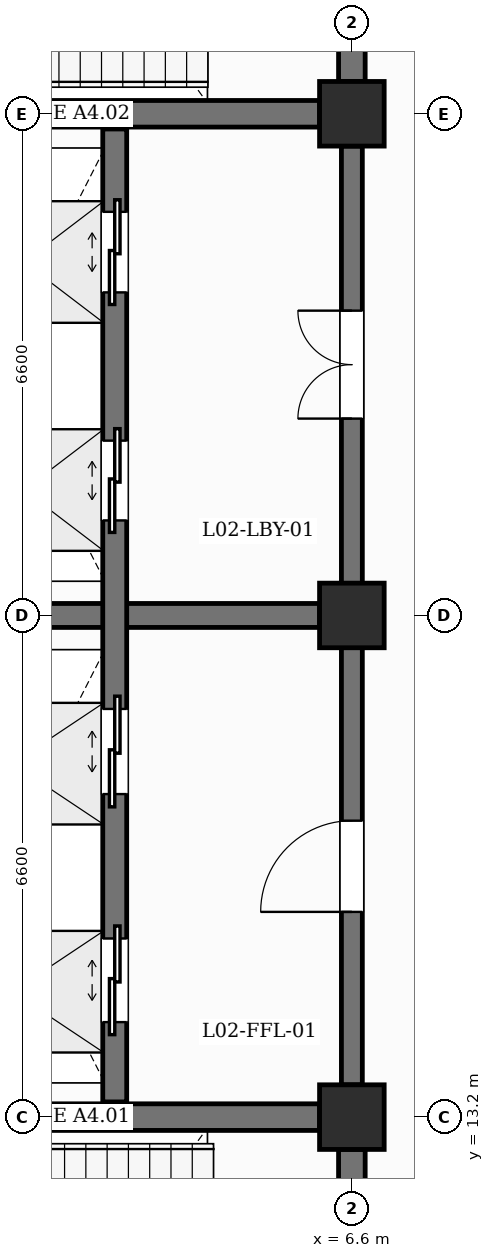
"""IFC4 building model, lengths in metres.
Left out: names, types, materials, properties, quantities, classifications, styles, units other than length and angle.
Written with IfcOpenShell. Run it as: python <this file> out.ifc"""

import sys

from ifc_helpers import new_model, si_unit, direction, frame, frame_2d, origin, origin_2d, place, context, subcontext, project, spatial, rectangle, extrude, element, fill, save


model = new_model("IFC4")
c1 = context("Model", 3, precision=1e-05, world=origin(), true_north=direction((0.0, 1.0)))
c2 = subcontext(c1, "Body", "Model", "MODEL_VIEW")
j1 = project(units=[si_unit("LENGTHUNIT", "METRE"), si_unit("PLANEANGLEUNIT", "RADIAN")], contexts=[c1])
p1 = place(None, origin())
s1 = spatial("IfcSite", under=j1, at=p1, CompositionType="ELEMENT")
p2 = place(p1, origin())
s2 = spatial("IfcBuilding", under=s1, at=p2, CompositionType="ELEMENT")
p3 = place(p2, frame((0.0, 0.0, 10.2)))
s3 = spatial("IfcBuildingStorey", under=s2, at=p3, CompositionType="ELEMENT", Elevation=10.2)
for number, where, z_axis, x_axis in (
    (1, (6.6, 13.2, 0.0), (0.0, 0.0, 1.0), (1.0, 0.0, 0.0)),
    (2, (6.6, 19.8, 0.0), (0.0, 0.0, 1.0), (1.0, 0.0, 0.0)),
    (3, (6.6, 26.4, 0.0), (0.0, 0.0, 1.0), (1.0, 0.0, 0.0)),
):
    element("IfcColumn", number, at=place(p3, frame(where, z_axis=z_axis, x_axis=x_axis)), inside=s3, PredefinedType="COLUMN", context=c2, shape_type="SweptSolid", body=[
        extrude(rectangle(XDim=0.85, YDim=0.85, at=origin_2d()), origin(), (0.0, 0.0, 1.0), 4.2),
    ])
p4 = place(p3, frame((0.425, 13.2, 0.0), z_axis=(0.0, 0.0, 1.0), x_axis=(1.0, 0.0, 0.0)))
e4 = element("IfcWall", 4, at=p4, inside=s3, PredefinedType="SHEAR", context=c2, shape_type="SweptSolid", body=[
    extrude(rectangle(XDim=5.75, YDim=0.35, at=frame_2d((2.875, 0.0))), origin(), (0.0, 0.0, 1.0), 3.0),
])
p5 = place(p3, frame((6.6, 7.025, 0.0), z_axis=(0.0, 0.0, 1.0), x_axis=(0.0, 1.0, 0.0)))
e5 = element("IfcWall", 5, at=p5, inside=s3, PredefinedType="SHEAR", context=c2, shape_type="SweptSolid", body=[
    extrude(rectangle(XDim=5.75, YDim=0.35, at=frame_2d((2.875, 0.0))), origin(), (0.0, 0.0, 1.0), 3.1),
])
p6 = place(p5, frame((2.3, 0.0, 0.0)))
e6 = element("IfcOpeningElement", 6, at=p6, cuts=e5, PredefinedType="OPENING", context=c2, shape_type="SweptSolid", body=[
    extrude(rectangle(XDim=1.15, YDim=2.2, at=frame_2d((0.575, 1.1))), frame((0.0, 0.185, 0.0), z_axis=(0.0, -1.0, 0.0), x_axis=(1.0, 0.0, 0.0)), (0.0, 0.0, 1.0), 0.37),
])
p7 = place(p3, frame((0.425, 26.4, 0.0), z_axis=(0.0, 0.0, 1.0), x_axis=(1.0, 0.0, 0.0)))
e7 = element("IfcWall", 7, at=p7, inside=s3, PredefinedType="SHEAR", context=c2, shape_type="SweptSolid", body=[
    extrude(rectangle(XDim=5.75, YDim=0.35, at=frame_2d((2.875, 0.0))), origin(), (0.0, 0.0, 1.0), 3.0),
])
p8 = place(p3, frame((6.6, 26.825, 0.0), z_axis=(0.0, 0.0, 1.0), x_axis=(0.0, 1.0, 0.0)))
e8 = element("IfcWall", 8, at=p8, inside=s3, PredefinedType="SHEAR", context=c2, shape_type="SweptSolid", body=[
    extrude(rectangle(XDim=5.75, YDim=0.35, at=frame_2d((2.875, 0.0))), origin(), (0.0, 0.0, 1.0), 3.1),
])
p9 = place(p8, frame((2.3, 0.0, 0.0)))
e9 = element("IfcOpeningElement", 9, at=p9, cuts=e8, PredefinedType="OPENING", context=c2, shape_type="SweptSolid", body=[
    extrude(rectangle(XDim=1.15, YDim=2.2, at=frame_2d((0.575, 1.1))), frame((0.0, 0.185, 0.0), z_axis=(0.0, -1.0, 0.0), x_axis=(1.0, 0.0, 0.0)), (0.0, 0.0, 1.0), 0.37),
])
p10 = place(p3, frame((0.425, 19.8, 0.0), z_axis=(0.0, 0.0, 1.0), x_axis=(1.0, 0.0, 0.0)))
e10 = element("IfcWall", 10, at=p10, inside=s3, PredefinedType="SHEAR", context=c2, shape_type="SweptSolid", body=[
    extrude(rectangle(XDim=5.75, YDim=0.315, at=frame_2d((2.875, 0.0))), origin(), (0.0, 0.0, 1.0), 3.1),
])
p11 = place(p3, frame((6.6, 13.625, 0.0), z_axis=(0.0, 0.0, 1.0), x_axis=(0.0, 1.0, 0.0)))
e11 = element("IfcWall", 11, at=p11, inside=s3, PredefinedType="SHEAR", context=c2, shape_type="SweptSolid", body=[
    extrude(rectangle(XDim=5.75, YDim=0.275, at=frame_2d((2.875, 0.0))), origin(), (0.0, 0.0, 1.0), 3.1),
])
p12 = place(p11, frame((2.275, 0.0, 0.0)))
e12 = element("IfcOpeningElement", 12, at=p12, cuts=e11, PredefinedType="OPENING", context=c2, shape_type="SweptSolid", body=[
    extrude(rectangle(XDim=1.2, YDim=2.25, at=frame_2d((0.6, 1.125))), frame((0.0, 0.147, 0.0), z_axis=(0.0, -1.0, 0.0), x_axis=(1.0, 0.0, 0.0)), (0.0, 0.0, 1.0), 0.295),
])
p13 = place(p3, frame((6.6, 20.225, 0.0), z_axis=(0.0, 0.0, 1.0), x_axis=(0.0, 1.0, 0.0)))
e13 = element("IfcWall", 13, at=p13, inside=s3, PredefinedType="SHEAR", context=c2, shape_type="SweptSolid", body=[
    extrude(rectangle(XDim=5.75, YDim=0.275, at=frame_2d((2.875, 0.0))), origin(), (0.0, 0.0, 1.0), 3.1),
])
p14 = place(p13, frame((2.165, 0.0, 0.0)))
e14 = element("IfcOpeningElement", 14, at=p14, cuts=e13, PredefinedType="OPENING", context=c2, shape_type="SweptSolid", body=[
    extrude(rectangle(XDim=1.42, YDim=2.2, at=frame_2d((0.71, 1.1))), frame((0.0, 0.147, 0.0), z_axis=(0.0, -1.0, 0.0), x_axis=(1.0, 0.0, 0.0)), (0.0, 0.0, 1.0), 0.295),
])
p15 = place(p3, frame((3.48, 13.4, 0.0), z_axis=(0.0, 0.0, 1.0), x_axis=(0.0, 1.0, 0.0)))
e15 = element("IfcWall", 15, at=p15, inside=s3, PredefinedType="SHEAR", context=c2, shape_type="SweptSolid", body=[
    extrude(rectangle(XDim=6.2, YDim=0.315, at=frame_2d((3.1, 0.0))), origin(), (0.0, 0.0, 1.0), 3.85),
])
p16 = place(p15, frame((1.05, 0.0, 0.0)))
e16 = element("IfcOpeningElement", 16, at=p16, cuts=e15, PredefinedType="OPENING", context=c2, shape_type="SweptSolid", body=[
    extrude(rectangle(XDim=1.1, YDim=2.15, at=frame_2d((0.55, 1.075))), frame((0.0, 0.167, 0.0), z_axis=(0.0, -1.0, 0.0), x_axis=(1.0, 0.0, 0.0)), (0.0, 0.0, 1.0), 0.335),
])
p17 = place(p15, frame((4.05, 0.0, 0.0)))
e17 = element("IfcOpeningElement", 17, at=p17, cuts=e15, PredefinedType="OPENING", context=c2, shape_type="SweptSolid", body=[
    extrude(rectangle(XDim=1.12, YDim=2.15, at=frame_2d((0.56, 1.075))), frame((0.0, 0.167, 0.0), z_axis=(0.0, -1.0, 0.0), x_axis=(1.0, 0.0, 0.0)), (0.0, 0.0, 1.0), 0.335),
])
p18 = place(p3, frame((3.48, 20.0, 0.0), z_axis=(0.0, 0.0, 1.0), x_axis=(0.0, 1.0, 0.0)))
e18 = element("IfcWall", 18, at=p18, inside=s3, PredefinedType="SHEAR", context=c2, shape_type="SweptSolid", body=[
    extrude(rectangle(XDim=6.2, YDim=0.315, at=frame_2d((3.1, 0.0))), origin(), (0.0, 0.0, 1.0), 3.85),
])
p19 = place(p18, frame((1.05, 0.0, 0.0)))
e19 = element("IfcOpeningElement", 19, at=p19, cuts=e18, PredefinedType="OPENING", context=c2, shape_type="SweptSolid", body=[
    extrude(rectangle(XDim=1.05, YDim=2.15, at=frame_2d((0.525, 1.075))), frame((0.0, 0.167, 0.0), z_axis=(0.0, -1.0, 0.0), x_axis=(1.0, 0.0, 0.0)), (0.0, 0.0, 1.0), 0.335),
])
p20 = place(p18, frame((4.05, 0.0, 0.0)))
e20 = element("IfcOpeningElement", 20, at=p20, cuts=e18, PredefinedType="OPENING", context=c2, shape_type="SweptSolid", body=[
    extrude(rectangle(XDim=1.06, YDim=2.15, at=frame_2d((0.53, 1.075))), frame((0.0, 0.167, 0.0), z_axis=(0.0, -1.0, 0.0), x_axis=(1.0, 0.0, 0.0)), (0.0, 0.0, 1.0), 0.335),
])
p21 = place(p16, origin())
e21 = element("IfcDoor", 21, at=p21, inside=s3, OperationType="DOUBLE_DOOR_SLIDING", PredefinedType="USERDEFINED", context=c2, shape_type="SweptSolid", body=[
    extrude(rectangle(XDim=1.1, YDim=2.15, at=frame_2d((0.55, 1.075))), frame((0.0, 0.025, 0.0), z_axis=(0.0, -1.0, 0.0), x_axis=(1.0, 0.0, 0.0)), (0.0, 0.0, 1.0), 0.05),
])
fill(e16, e21)
p22 = place(p17, origin())
e22 = element("IfcDoor", 22, at=p22, inside=s3, OperationType="DOUBLE_DOOR_SLIDING", PredefinedType="USERDEFINED", context=c2, shape_type="SweptSolid", body=[
    extrude(rectangle(XDim=1.12, YDim=2.15, at=frame_2d((0.56, 1.075))), frame((0.0, 0.025, 0.0), z_axis=(0.0, -1.0, 0.0), x_axis=(1.0, 0.0, 0.0)), (0.0, 0.0, 1.0), 0.05),
])
fill(e17, e22)
p23 = place(p19, origin())
e23 = element("IfcDoor", 23, at=p23, inside=s3, OperationType="DOUBLE_DOOR_SLIDING", PredefinedType="USERDEFINED", context=c2, shape_type="SweptSolid", body=[
    extrude(rectangle(XDim=1.05, YDim=2.15, at=frame_2d((0.525, 1.075))), frame((0.0, 0.025, 0.0), z_axis=(0.0, -1.0, 0.0), x_axis=(1.0, 0.0, 0.0)), (0.0, 0.0, 1.0), 0.05),
])
fill(e19, e23)
p24 = place(p20, origin())
e24 = element("IfcDoor", 24, at=p24, inside=s3, OperationType="DOUBLE_DOOR_SLIDING", PredefinedType="USERDEFINED", context=c2, shape_type="SweptSolid", body=[
    extrude(rectangle(XDim=1.06, YDim=2.15, at=frame_2d((0.53, 1.075))), frame((0.0, 0.025, 0.0), z_axis=(0.0, -1.0, 0.0), x_axis=(1.0, 0.0, 0.0)), (0.0, 0.0, 1.0), 0.05),
])
fill(e20, e24)
p25 = place(p12, origin())
e25 = element("IfcDoor", 25, at=p25, inside=s3, OperationType="SINGLE_SWING_LEFT", PredefinedType="DOOR", context=c2, shape_type="SweptSolid", body=[
    extrude(rectangle(XDim=1.2, YDim=2.25, at=frame_2d((0.6, 1.125))), frame((0.0, 0.025, 0.0), z_axis=(0.0, -1.0, 0.0), x_axis=(1.0, 0.0, 0.0)), (0.0, 0.0, 1.0), 0.05),
])
fill(e12, e25)
p26 = place(p14, origin())
e26 = element("IfcDoor", 26, at=p26, inside=s3, OperationType="DOUBLE_DOOR_SINGLE_SWING", PredefinedType="DOOR", context=c2, shape_type="SweptSolid", body=[
    extrude(rectangle(XDim=1.42, YDim=2.2, at=frame_2d((0.71, 1.1))), frame((0.0, 0.025, 0.0), z_axis=(0.0, -1.0, 0.0), x_axis=(1.0, 0.0, 0.0)), (0.0, 0.0, 1.0), 0.05),
])
fill(e14, e26)
save(model, sys.argv[1])
